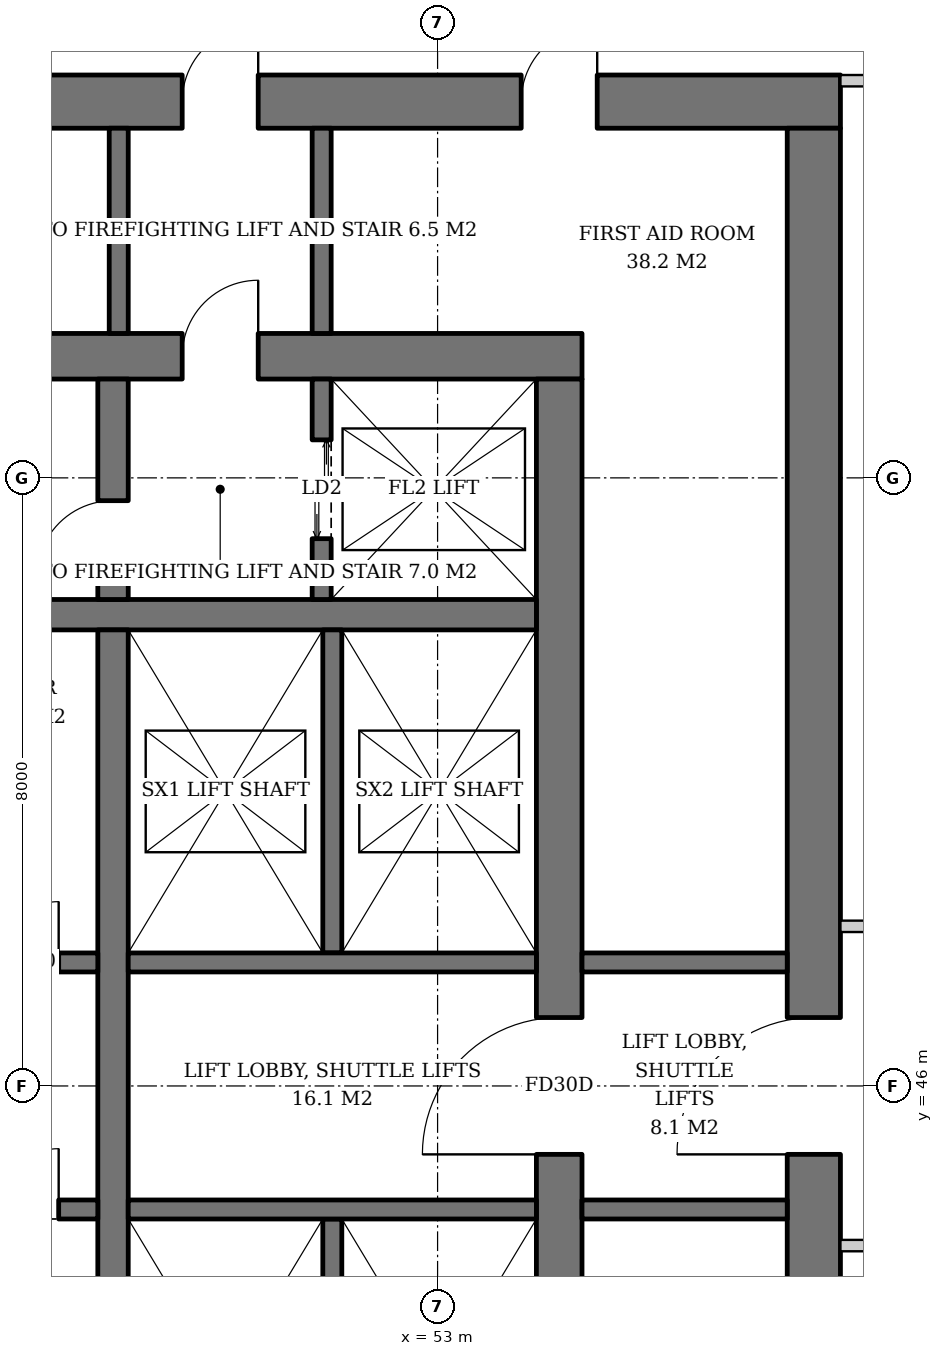
"""IFC4 building model, lengths in metres.
Left out: names, types, materials, properties, quantities, classifications, styles, units other than length and angle.
Written with IfcOpenShell. Run it as: python <this file> out.ifc"""

import sys

from ifc_helpers import new_model, si_unit, direction, frame, frame_2d, origin, place, context, subcontext, project, spatial, rectangle, extrude, element, fill, save


model = new_model("IFC4")
c1 = context("Model", 3, precision=1e-05, world=origin(), true_north=direction((0.0, 1.0)))
c2 = subcontext(c1, "Body", "Model", "MODEL_VIEW")
j1 = project(units=[si_unit("LENGTHUNIT", "METRE"), si_unit("PLANEANGLEUNIT", "RADIAN")], contexts=[c1])
p1 = place(None, origin())
s1 = spatial("IfcSite", under=j1, at=p1, CompositionType="ELEMENT")
p2 = place(p1, origin())
s2 = spatial("IfcBuilding", under=s1, at=p2, CompositionType="ELEMENT")
p3 = place(p2, frame((0.0, 0.0, 104.6)))
s3 = spatial("IfcBuildingStorey", under=s2, at=p3, CompositionType="ELEMENT", Elevation=104.6)
p4 = place(p3, frame((35.1, 55.6, 0.0), z_axis=(0.0, 0.0, 1.0), x_axis=(1.0, 0.0, 0.0)))
e1 = element("IfcWall", 1, at=p4, inside=s3, PredefinedType="SHEAR", context=c2, shape_type="SweptSolid", body=[
    extrude(rectangle(XDim=19.8, YDim=0.6, at=frame_2d((9.9, 0.0))), origin(), (0.0, 0.0, 1.0), 3.8),
])
p5 = place(p4, frame((14.54, 0.0, 0.0)))
e2 = element("IfcOpeningElement", 2, at=p5, cuts=e1, PredefinedType="OPENING", context=c2, shape_type="SweptSolid", body=[
    extrude(rectangle(XDim=1.0, YDim=2.1, at=frame_2d((0.5, 1.05))), frame((0.0, 0.31, 0.0), z_axis=(0.0, -1.0, 0.0), x_axis=(1.0, 0.0, 0.0)), (0.0, 0.0, 1.0), 0.62),
])
p6 = place(p4, frame((2.425, 0.0, 0.0)))
e3 = element("IfcOpeningElement", 3, at=p6, cuts=e1, PredefinedType="OPENING", context=c2, shape_type="SweptSolid", body=[
    extrude(rectangle(XDim=1.0, YDim=2.1, at=frame_2d((0.5, 1.05))), frame((0.0, 0.31, 0.0), z_axis=(0.0, -1.0, 0.0), x_axis=(1.0, 0.0, 0.0)), (0.0, 0.0, 1.0), 0.62),
])
p7 = place(p3, frame((54.6, 36.7, 0.0), z_axis=(0.0, 0.0, 1.0), x_axis=(0.0, 1.0, 0.0)))
e4 = element("IfcWall", 4, at=p7, inside=s3, PredefinedType="SHEAR", context=c2, shape_type="SweptSolid", body=[
    extrude(rectangle(XDim=18.6, YDim=0.6, at=frame_2d((9.3, 0.0))), origin(), (0.0, 0.0, 1.0), 3.8),
])
p8 = place(p7, frame((8.4, 0.0, 0.0)))
e5 = element("IfcOpeningElement", 5, at=p8, cuts=e4, PredefinedType="OPENING", context=c2, shape_type="SweptSolid", body=[
    extrude(rectangle(XDim=1.8, YDim=2.4, at=frame_2d((0.9, 1.2))), frame((0.0, 0.31, 0.0), z_axis=(0.0, -1.0, 0.0), x_axis=(1.0, 0.0, 0.0)), (0.0, 0.0, 1.0), 0.62),
])
p9 = place(p3, frame((31.7, 58.95, 0.0), z_axis=(0.0, 0.0, 1.0), x_axis=(1.0, 0.0, 0.0)))
e6 = element("IfcWall", 6, at=p9, inside=s3, PredefinedType="SHEAR", context=c2, shape_type="SweptSolid", body=[
    extrude(rectangle(XDim=26.6, YDim=0.7, at=frame_2d((13.3, 0.0))), origin(), (0.0, 0.0, 1.0), 3.8),
])
p10 = place(p9, frame((17.94, 0.0, 0.0)))
e7 = element("IfcOpeningElement", 7, at=p10, cuts=e6, PredefinedType="OPENING", context=c2, shape_type="SweptSolid", body=[
    extrude(rectangle(XDim=1.0, YDim=2.1, at=frame_2d((0.5, 1.05))), frame((0.0, 0.36, 0.0), z_axis=(0.0, -1.0, 0.0), x_axis=(1.0, 0.0, 0.0)), (0.0, 0.0, 1.0), 0.72),
])
p11 = place(p9, frame((5.825, 0.0, 0.0)))
e8 = element("IfcOpeningElement", 8, at=p11, cuts=e6, PredefinedType="OPENING", context=c2, shape_type="SweptSolid", body=[
    extrude(rectangle(XDim=1.0, YDim=2.1, at=frame_2d((0.5, 1.05))), frame((0.0, 0.36, 0.0), z_axis=(0.0, -1.0, 0.0), x_axis=(1.0, 0.0, 0.0)), (0.0, 0.0, 1.0), 0.72),
])
p12 = place(p9, frame((0.978, 0.0, 0.0)))
e9 = element("IfcOpeningElement", 9, at=p12, cuts=e6, PredefinedType="OPENING", context=c2, shape_type="SweptSolid", body=[
    extrude(rectangle(XDim=1.0, YDim=2.1, at=frame_2d((0.5, 1.05))), frame((0.0, 0.36, 0.0), z_axis=(0.0, -1.0, 0.0), x_axis=(1.0, 0.0, 0.0)), (0.0, 0.0, 1.0), 0.72),
])
p13 = place(p9, frame((2.587, 0.0, 0.0)))
e10 = element("IfcOpeningElement", 10, at=p13, cuts=e6, PredefinedType="OPENING", context=c2, shape_type="SweptSolid", body=[
    extrude(rectangle(XDim=1.0, YDim=2.1, at=frame_2d((0.5, 1.05))), frame((0.0, 0.36, 0.0), z_axis=(0.0, -1.0, 0.0), x_axis=(1.0, 0.0, 0.0)), (0.0, 0.0, 1.0), 0.72),
])
p14 = place(p9, frame((4.211, 0.0, 0.0)))
e11 = element("IfcOpeningElement", 11, at=p14, cuts=e6, PredefinedType="OPENING", context=c2, shape_type="SweptSolid", body=[
    extrude(rectangle(XDim=1.0, YDim=2.1, at=frame_2d((0.5, 1.05))), frame((0.0, 0.36, 0.0), z_axis=(0.0, -1.0, 0.0), x_axis=(1.0, 0.0, 0.0)), (0.0, 0.0, 1.0), 0.72),
])
p15 = place(p9, frame((9.126, 0.0, 0.0)))
e12 = element("IfcOpeningElement", 12, at=p15, cuts=e6, PredefinedType="OPENING", context=c2, shape_type="SweptSolid", body=[
    extrude(rectangle(XDim=1.0, YDim=2.1, at=frame_2d((0.5, 1.05))), frame((0.0, 0.36, 0.0), z_axis=(0.0, -1.0, 0.0), x_axis=(1.0, 0.0, 0.0)), (0.0, 0.0, 1.0), 0.72),
])
p16 = place(p9, frame((14.029, 0.0, 0.0)))
e13 = element("IfcOpeningElement", 13, at=p16, cuts=e6, PredefinedType="OPENING", context=c2, shape_type="SweptSolid", body=[
    extrude(rectangle(XDim=1.0, YDim=2.1, at=frame_2d((0.5, 1.05))), frame((0.0, 0.36, 0.0), z_axis=(0.0, -1.0, 0.0), x_axis=(1.0, 0.0, 0.0)), (0.0, 0.0, 1.0), 0.72),
])
p17 = place(p9, frame((22.4, 0.0, 0.0)))
e14 = element("IfcOpeningElement", 14, at=p17, cuts=e6, PredefinedType="OPENING", context=c2, shape_type="SweptSolid", body=[
    extrude(rectangle(XDim=1.0, YDim=2.1, at=frame_2d((0.5, 1.05))), frame((0.0, 0.36, 0.0), z_axis=(0.0, -1.0, 0.0), x_axis=(1.0, 0.0, 0.0)), (0.0, 0.0, 1.0), 0.72),
])
p18 = place(p3, frame((57.95, 33.4, 0.0), z_axis=(0.0, 0.0, 1.0), x_axis=(0.0, 1.0, 0.0)))
e15 = element("IfcWall", 15, at=p18, inside=s3, PredefinedType="SHEAR", context=c2, shape_type="SweptSolid", body=[
    extrude(rectangle(XDim=25.2, YDim=0.7, at=frame_2d((12.6, 0.0))), origin(), (0.0, 0.0, 1.0), 3.8),
])
p19 = place(p18, frame((11.7, 0.0, 0.0)))
e16 = element("IfcOpeningElement", 16, at=p19, cuts=e15, PredefinedType="OPENING", context=c2, shape_type="SweptSolid", body=[
    extrude(rectangle(XDim=1.8, YDim=2.4, at=frame_2d((0.9, 1.2))), frame((0.0, 0.36, 0.0), z_axis=(0.0, -1.0, 0.0), x_axis=(1.0, 0.0, 0.0)), (0.0, 0.0, 1.0), 0.72),
])
p20 = place(p3, frame((35.7, 52.2, 0.0), z_axis=(0.0, 0.0, 1.0), x_axis=(1.0, 0.0, 0.0)))
e17 = element("IfcWall", 17, at=p20, inside=s3, PredefinedType="SHEAR", context=c2, shape_type="SweptSolid", body=[
    extrude(rectangle(XDim=18.6, YDim=0.4, at=frame_2d((9.3, 0.0))), origin(), (0.0, 0.0, 1.0), 3.8),
])
p21 = place(p3, frame((48.73, 40.0, 0.0), z_axis=(0.0, 0.0, 1.0), x_axis=(0.0, 1.0, 0.0)))
e18 = element("IfcWall", 18, at=p21, inside=s3, PredefinedType="SHEAR", context=c2, shape_type="SweptSolid", body=[
    extrude(rectangle(XDim=12.0, YDim=0.4, at=frame_2d((6.0, 0.0))), origin(), (0.0, 0.0, 1.0), 3.8),
])
p22 = place(p3, frame((48.73, 52.4, 0.0), z_axis=(0.0, 0.0, 1.0), x_axis=(0.0, 1.0, 0.0)))
e19 = element("IfcWall", 19, at=p22, inside=s3, PredefinedType="SHEAR", context=c2, shape_type="SweptSolid", body=[
    extrude(rectangle(XDim=2.9, YDim=0.4, at=frame_2d((1.45, 0.0))), origin(), (0.0, 0.0, 1.0), 3.8),
])
p23 = place(p22, frame((0.3, 0.0, 0.0)))
e20 = element("IfcOpeningElement", 20, at=p23, cuts=e19, PredefinedType="OPENING", context=c2, shape_type="SweptSolid", body=[
    extrude(rectangle(XDim=1.0, YDim=2.1, at=frame_2d((0.5, 1.05))), frame((0.0, 0.21, 0.0), z_axis=(0.0, -1.0, 0.0), x_axis=(1.0, 0.0, 0.0)), (0.0, 0.0, 1.0), 0.42),
])
p24 = place(p3, frame((51.475, 52.4, 0.0), z_axis=(0.0, 0.0, 1.0), x_axis=(0.0, 1.0, 0.0)))
e21 = element("IfcWall", 21, at=p24, inside=s3, PredefinedType="SHEAR", context=c2, shape_type="SweptSolid", body=[
    extrude(rectangle(XDim=2.9, YDim=0.25, at=frame_2d((1.45, 0.0))), origin(), (0.0, 0.0, 1.0), 3.8),
])
p25 = place(p24, frame((0.8, 0.0, 0.0)))
e22 = element("IfcOpeningElement", 22, at=p25, cuts=e21, PredefinedType="OPENING", context=c2, shape_type="SweptSolid", body=[
    extrude(rectangle(XDim=1.3, YDim=2.2, at=frame_2d((0.65, 1.1))), frame((0.0, 0.135, 0.0), z_axis=(0.0, -1.0, 0.0), x_axis=(1.0, 0.0, 0.0)), (0.0, 0.0, 1.0), 0.27),
])
p26 = place(p3, frame((35.7, 47.625, 0.0), z_axis=(0.0, 0.0, 1.0), x_axis=(1.0, 0.0, 0.0)))
e23 = element("IfcWall", 23, at=p26, inside=s3, PredefinedType="SHEAR", context=c2, shape_type="SweptSolid", body=[
    extrude(rectangle(XDim=12.83, YDim=0.25, at=frame_2d((6.415, 0.0))), origin(), (0.0, 0.0, 1.0), 3.8),
])
p27 = place(p26, frame((0.7, 0.0, 0.0)))
e24 = element("IfcOpeningElement", 24, at=p27, cuts=e23, PredefinedType="OPENING", context=c2, shape_type="SweptSolid", body=[
    extrude(rectangle(XDim=1.1, YDim=2.2, at=frame_2d((0.55, 1.1))), frame((0.0, 0.135, 0.0), z_axis=(0.0, -1.0, 0.0), x_axis=(1.0, 0.0, 0.0)), (0.0, 0.0, 1.0), 0.27),
])
p28 = place(p26, frame((3.45, 0.0, 0.0)))
e25 = element("IfcOpeningElement", 25, at=p28, cuts=e23, PredefinedType="OPENING", context=c2, shape_type="SweptSolid", body=[
    extrude(rectangle(XDim=1.1, YDim=2.2, at=frame_2d((0.55, 1.1))), frame((0.0, 0.135, 0.0), z_axis=(0.0, -1.0, 0.0), x_axis=(1.0, 0.0, 0.0)), (0.0, 0.0, 1.0), 0.27),
])
p29 = place(p26, frame((6.2, 0.0, 0.0)))
e26 = element("IfcOpeningElement", 26, at=p29, cuts=e23, PredefinedType="OPENING", context=c2, shape_type="SweptSolid", body=[
    extrude(rectangle(XDim=1.1, YDim=2.2, at=frame_2d((0.55, 1.1))), frame((0.0, 0.135, 0.0), z_axis=(0.0, -1.0, 0.0), x_axis=(1.0, 0.0, 0.0)), (0.0, 0.0, 1.0), 0.27),
])
p30 = place(p26, frame((8.95, 0.0, 0.0)))
e27 = element("IfcOpeningElement", 27, at=p30, cuts=e23, PredefinedType="OPENING", context=c2, shape_type="SweptSolid", body=[
    extrude(rectangle(XDim=1.1, YDim=2.2, at=frame_2d((0.55, 1.1))), frame((0.0, 0.135, 0.0), z_axis=(0.0, -1.0, 0.0), x_axis=(1.0, 0.0, 0.0)), (0.0, 0.0, 1.0), 0.27),
])
p31 = place(p26, frame((11.515, 0.0, 0.0)))
e28 = element("IfcOpeningElement", 28, at=p31, cuts=e23, PredefinedType="OPENING", context=c2, shape_type="SweptSolid", body=[
    extrude(rectangle(XDim=0.8, YDim=2.0, at=frame_2d((0.4, 1.0))), frame((0.0, 0.135, 0.0), z_axis=(0.0, -1.0, 0.0), x_axis=(1.0, 0.0, 0.0)), (0.0, 0.0, 1.0), 0.27),
])
p32 = place(p3, frame((35.7, 44.375, 0.0), z_axis=(0.0, 0.0, 1.0), x_axis=(1.0, 0.0, 0.0)))
e29 = element("IfcWall", 29, at=p32, inside=s3, PredefinedType="SHEAR", context=c2, shape_type="SweptSolid", body=[
    extrude(rectangle(XDim=12.83, YDim=0.25, at=frame_2d((6.415, 0.0))), origin(), (0.0, 0.0, 1.0), 3.8),
])
p33 = place(p32, frame((0.7, 0.0, 0.0)))
e30 = element("IfcOpeningElement", 30, at=p33, cuts=e29, PredefinedType="OPENING", context=c2, shape_type="SweptSolid", body=[
    extrude(rectangle(XDim=1.1, YDim=2.2, at=frame_2d((0.55, 1.1))), frame((0.0, 0.135, 0.0), z_axis=(0.0, -1.0, 0.0), x_axis=(1.0, 0.0, 0.0)), (0.0, 0.0, 1.0), 0.27),
])
p34 = place(p32, frame((3.45, 0.0, 0.0)))
e31 = element("IfcOpeningElement", 31, at=p34, cuts=e29, PredefinedType="OPENING", context=c2, shape_type="SweptSolid", body=[
    extrude(rectangle(XDim=1.1, YDim=2.2, at=frame_2d((0.55, 1.1))), frame((0.0, 0.135, 0.0), z_axis=(0.0, -1.0, 0.0), x_axis=(1.0, 0.0, 0.0)), (0.0, 0.0, 1.0), 0.27),
])
p35 = place(p32, frame((6.2, 0.0, 0.0)))
e32 = element("IfcOpeningElement", 32, at=p35, cuts=e29, PredefinedType="OPENING", context=c2, shape_type="SweptSolid", body=[
    extrude(rectangle(XDim=1.1, YDim=2.2, at=frame_2d((0.55, 1.1))), frame((0.0, 0.135, 0.0), z_axis=(0.0, -1.0, 0.0), x_axis=(1.0, 0.0, 0.0)), (0.0, 0.0, 1.0), 0.27),
])
p36 = place(p32, frame((8.95, 0.0, 0.0)))
e33 = element("IfcOpeningElement", 33, at=p36, cuts=e29, PredefinedType="OPENING", context=c2, shape_type="SweptSolid", body=[
    extrude(rectangle(XDim=1.1, YDim=2.2, at=frame_2d((0.55, 1.1))), frame((0.0, 0.135, 0.0), z_axis=(0.0, -1.0, 0.0), x_axis=(1.0, 0.0, 0.0)), (0.0, 0.0, 1.0), 0.27),
])
p37 = place(p32, frame((11.515, 0.0, 0.0)))
e34 = element("IfcOpeningElement", 34, at=p37, cuts=e29, PredefinedType="OPENING", context=c2, shape_type="SweptSolid", body=[
    extrude(rectangle(XDim=0.8, YDim=2.0, at=frame_2d((0.4, 1.0))), frame((0.0, 0.135, 0.0), z_axis=(0.0, -1.0, 0.0), x_axis=(1.0, 0.0, 0.0)), (0.0, 0.0, 1.0), 0.27),
])
p38 = place(p3, frame((51.615, 47.75, 0.0), z_axis=(0.0, 0.0, 1.0), x_axis=(0.0, 1.0, 0.0)))
e35 = element("IfcWall", 35, at=p38, inside=s3, PredefinedType="SHEAR", context=c2, shape_type="SweptSolid", body=[
    extrude(rectangle(XDim=4.25, YDim=0.25, at=frame_2d((2.125, 0.0))), origin(), (0.0, 0.0, 1.0), 3.8),
])
p39 = place(p3, frame((48.93, 47.625, 0.0), z_axis=(0.0, 0.0, 1.0), x_axis=(1.0, 0.0, 0.0)))
e36 = element("IfcWall", 36, at=p39, inside=s3, PredefinedType="SHEAR", context=c2, shape_type="SweptSolid", body=[
    extrude(rectangle(XDim=5.37, YDim=0.25, at=frame_2d((2.685, 0.0))), origin(), (0.0, 0.0, 1.0), 3.8),
])
p40 = place(p3, frame((51.615, 44.25, 0.0), z_axis=(0.0, 0.0, 1.0), x_axis=(0.0, -1.0, 0.0)))
e37 = element("IfcWall", 37, at=p40, inside=s3, PredefinedType="SHEAR", context=c2, shape_type="SweptSolid", body=[
    extrude(rectangle(XDim=4.25, YDim=0.25, at=frame_2d((2.125, 0.0))), origin(), (0.0, 0.0, 1.0), 3.8),
])
p41 = place(p3, frame((48.93, 44.375, 0.0), z_axis=(0.0, 0.0, 1.0), x_axis=(1.0, 0.0, 0.0)))
e38 = element("IfcWall", 38, at=p41, inside=s3, PredefinedType="SHEAR", context=c2, shape_type="SweptSolid", body=[
    extrude(rectangle(XDim=5.37, YDim=0.25, at=frame_2d((2.685, 0.0))), origin(), (0.0, 0.0, 1.0), 3.8),
])
for number, where, z_axis, x_axis in (
    (39, (48.805, 55.9, 0.0), (0.0, 0.0, 1.0), (0.0, 1.0, 0.0)),
    (40, (51.475, 55.9, 0.0), (0.0, 0.0, 1.0), (0.0, 1.0, 0.0)),
    (41, (54.9, 44.375, 0.0), (0.0, 0.0, 1.0), (1.0, 0.0, 0.0)),
    (42, (54.9, 47.625, 0.0), (0.0, 0.0, 1.0), (1.0, 0.0, 0.0)),
):
    element("IfcWall", number, at=place(p3, frame(where, z_axis=z_axis, x_axis=x_axis)), inside=s3, PredefinedType="SOLIDWALL", context=c2, shape_type="SweptSolid", body=[
        extrude(rectangle(XDim=2.7, YDim=0.25, at=frame_2d((1.35, 0.0))), origin(), (0.0, 0.0, 1.0), 3.62),
    ])
for number, where, z_axis, x_axis in (
    (43, (58.3, 43.9, 0.0), (0.0, 0.0, 1.0), (1.0, 0.0, 0.0)),
    (44, (58.3, 48.1, 0.0), (0.0, 0.0, 1.0), (1.0, 0.0, 0.0)),
    (45, (58.3, 59.225, 0.0), (0.0, 0.0, 1.0), (1.0, 0.0, 0.0)),
):
    element("IfcWall", number, at=place(p3, frame(where, z_axis=z_axis, x_axis=x_axis)), inside=s3, PredefinedType="PARTITIONING", context=c2, shape_type="SweptSolid", body=[
        extrude(rectangle(XDim=2.325, YDim=0.15, at=frame_2d((1.163, 0.0))), origin(), (0.0, 0.0, 1.0), 3.62),
    ])
p42 = place(p25, origin())
e46 = element("IfcDoor", 46, at=p42, inside=s3, OperationType="DOUBLE_DOOR_SLIDING", PredefinedType="DOOR", context=c2, shape_type="SweptSolid", body=[
    extrude(rectangle(XDim=1.3, YDim=2.2, at=frame_2d((0.65, 1.1))), frame((0.0, 0.025, 0.0), z_axis=(0.0, -1.0, 0.0), x_axis=(1.0, 0.0, 0.0)), (0.0, 0.0, 1.0), 0.05),
])
fill(e22, e46)
p43 = place(p31, origin())
e47 = element("IfcDoor", 47, at=p43, inside=s3, OperationType="SINGLE_SWING_RIGHT", PredefinedType="DOOR", context=c2, shape_type="SweptSolid", body=[
    extrude(rectangle(XDim=0.8, YDim=2.0, at=frame_2d((0.4, 1.0))), frame((0.0, 0.025, 0.0), z_axis=(0.0, -1.0, 0.0), x_axis=(1.0, 0.0, 0.0)), (0.0, 0.0, 1.0), 0.05),
])
fill(e28, e47)
p44 = place(p37, origin())
e48 = element("IfcDoor", 48, at=p44, inside=s3, OperationType="SINGLE_SWING_RIGHT", PredefinedType="DOOR", context=c2, shape_type="SweptSolid", body=[
    extrude(rectangle(XDim=0.8, YDim=2.0, at=frame_2d((0.4, 1.0))), frame((0.0, 0.025, 0.0), z_axis=(0.0, -1.0, 0.0), x_axis=(1.0, 0.0, 0.0)), (0.0, 0.0, 1.0), 0.05),
])
fill(e34, e48)
p45 = place(p23, origin())
e49 = element("IfcDoor", 49, at=p45, inside=s3, OperationType="SINGLE_SWING_LEFT", PredefinedType="DOOR", context=c2, shape_type="SweptSolid", body=[
    extrude(rectangle(XDim=1.0, YDim=2.1, at=frame_2d((0.5, 1.05))), frame((0.0, 0.025, 0.0), z_axis=(0.0, -1.0, 0.0), x_axis=(1.0, 0.0, 0.0)), (0.0, 0.0, 1.0), 0.05),
])
fill(e20, e49)
p46 = place(p5, origin())
e50 = element("IfcDoor", 50, at=p46, inside=s3, OperationType="SINGLE_SWING_RIGHT", PredefinedType="DOOR", context=c2, shape_type="SweptSolid", body=[
    extrude(rectangle(XDim=1.0, YDim=2.1, at=frame_2d((0.5, 1.05))), frame((0.0, 0.025, 0.0), z_axis=(0.0, -1.0, 0.0), x_axis=(1.0, 0.0, 0.0)), (0.0, 0.0, 1.0), 0.05),
])
fill(e2, e50)
p47 = place(p8, origin())
e51 = element("IfcDoor", 51, at=p47, inside=s3, OperationType="DOUBLE_DOOR_SINGLE_SWING", PredefinedType="DOOR", context=c2, shape_type="SweptSolid", body=[
    extrude(rectangle(XDim=1.8, YDim=2.4, at=frame_2d((0.9, 1.2))), frame((0.0, 0.025, 0.0), z_axis=(0.0, -1.0, 0.0), x_axis=(1.0, 0.0, 0.0)), (0.0, 0.0, 1.0), 0.05),
])
fill(e5, e51)
p48 = place(p19, origin())
e52 = element("IfcDoor", 52, at=p48, inside=s3, OperationType="DOUBLE_DOOR_SINGLE_SWING", PredefinedType="DOOR", context=c2, shape_type="SweptSolid", body=[
    extrude(rectangle(XDim=1.8, YDim=2.4, at=frame_2d((0.9, 1.2))), frame((0.0, 0.025, 0.0), z_axis=(0.0, -1.0, 0.0), x_axis=(1.0, 0.0, 0.0)), (0.0, 0.0, 1.0), 0.05),
])
fill(e16, e52)
p49 = place(p10, origin())
e53 = element("IfcDoor", 53, at=p49, inside=s3, OperationType="SINGLE_SWING_RIGHT", PredefinedType="DOOR", context=c2, shape_type="SweptSolid", body=[
    extrude(rectangle(XDim=1.0, YDim=2.1, at=frame_2d((0.5, 1.05))), frame((0.0, 0.025, 0.0), z_axis=(0.0, -1.0, 0.0), x_axis=(1.0, 0.0, 0.0)), (0.0, 0.0, 1.0), 0.05),
])
fill(e7, e53)
p50 = place(p17, origin())
e54 = element("IfcDoor", 54, at=p50, inside=s3, OperationType="SINGLE_SWING_RIGHT", PredefinedType="DOOR", context=c2, shape_type="SweptSolid", body=[
    extrude(rectangle(XDim=1.0, YDim=2.1, at=frame_2d((0.5, 1.05))), frame((0.0, -0.29, 0.0), z_axis=(0.0, -1.0, 0.0), x_axis=(1.0, 0.0, 0.0)), (0.0, 0.0, 1.0), 0.05),
])
fill(e14, e54)
save(model, sys.argv[1])
